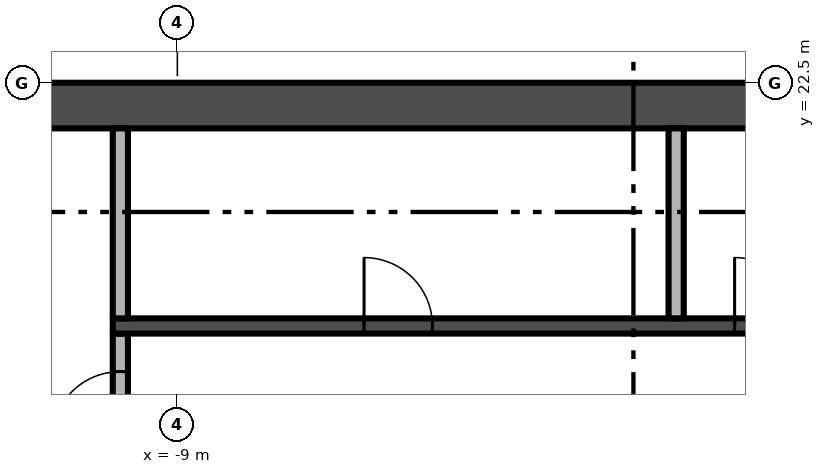
"""IFC4 building model, lengths in metres.
Left out: names, types, materials, properties, quantities, classifications, styles, units other than length and angle.
Written with IfcOpenShell. Run it as: python <this file> out.ifc"""

import sys

from ifc_helpers import new_model, si_unit, direction, frame, frame_2d, origin, place, context, subcontext, project, spatial, rectangle, extrude, element, fill, save


model = new_model("IFC4")
c1 = context("Model", 3, precision=1e-05, world=origin(), true_north=direction((0.0, 1.0)))
c2 = subcontext(c1, "Body", "Model", "MODEL_VIEW")
j1 = project(units=[si_unit("LENGTHUNIT", "METRE"), si_unit("PLANEANGLEUNIT", "RADIAN")], contexts=[c1])
p1 = place(None, origin())
s1 = spatial("IfcSite", under=j1, at=p1, CompositionType="ELEMENT")
p2 = place(p1, origin())
s2 = spatial("IfcBuilding", under=s1, at=p2, CompositionType="ELEMENT")
p3 = place(p2, frame((0.0, 0.0, 214.8)))
s3 = spatial("IfcBuildingStorey", under=s2, at=p3, CompositionType="ELEMENT", Elevation=214.8)
p4 = place(p3, frame((13.5, 22.2, -0.3), z_axis=(0.0, 0.0, 1.0), x_axis=(-1.0, 0.0, 0.0)))
e1 = element("IfcWall", 1, at=p4, inside=s3, PredefinedType="SHEAR", context=c2, shape_type="SweptSolid", body=[
    extrude(rectangle(XDim=27.0, YDim=0.6, at=frame_2d((13.5, 0.0))), origin(), (0.0, 0.0, 1.0), 3.8),
])
p5 = place(p3, frame((-9.75, 17.8, 0.0), z_axis=(0.0, 0.0, 1.0), x_axis=(0.0, 1.0, 0.0)))
e2 = element("IfcWall", 2, at=p5, inside=s3, PredefinedType="PARTITIONING", context=c2, shape_type="SweptSolid", body=[
    extrude(rectangle(XDim=1.4, YDim=0.2, at=frame_2d((0.7, 0.0))), origin(), (0.0, 0.0, 1.0), 3.5),
])
p6 = place(p5, origin())
e3 = element("IfcOpeningElement", 3, at=p6, cuts=e2, PredefinedType="OPENING", context=c2, shape_type="SweptSolid", body=[
    extrude(rectangle(XDim=0.9, YDim=2.1, at=frame_2d((0.45, 1.05))), frame((0.0, 0.11, 0.0), z_axis=(0.0, -1.0, 0.0), x_axis=(1.0, 0.0, 0.0)), (0.0, 0.0, 1.0), 0.22),
])
p7 = place(p3, frame((-9.85, 19.3, 0.0), z_axis=(0.0, 0.0, 1.0), x_axis=(1.0, 0.0, 0.0)))
e4 = element("IfcWall", 4, at=p7, inside=s3, PredefinedType="SHEAR", context=c2, shape_type="SweptSolid", body=[
    extrude(rectangle(XDim=19.7, YDim=0.2, at=frame_2d((9.85, 0.0))), origin(), (0.0, 0.0, 1.0), 3.5),
])
p8 = place(p7, frame((10.519, 0.0, 0.0)))
e5 = element("IfcOpeningElement", 5, at=p8, cuts=e4, PredefinedType="OPENING", context=c2, shape_type="SweptSolid", body=[
    extrude(rectangle(XDim=1.1, YDim=2.1, at=frame_2d((0.55, 1.05))), frame((0.0, 0.11, 0.0), z_axis=(0.0, -1.0, 0.0), x_axis=(1.0, 0.0, 0.0)), (0.0, 0.0, 1.0), 0.22),
])
p9 = place(p7, frame((12.956, 0.0, 0.0)))
e6 = element("IfcOpeningElement", 6, at=p9, cuts=e4, PredefinedType="OPENING", context=c2, shape_type="SweptSolid", body=[
    extrude(rectangle(XDim=1.1, YDim=2.1, at=frame_2d((0.55, 1.05))), frame((0.0, 0.11, 0.0), z_axis=(0.0, -1.0, 0.0), x_axis=(1.0, 0.0, 0.0)), (0.0, 0.0, 1.0), 0.22),
])
p10 = place(p7, frame((15.394, 0.0, 0.0)))
e7 = element("IfcOpeningElement", 7, at=p10, cuts=e4, PredefinedType="OPENING", context=c2, shape_type="SweptSolid", body=[
    extrude(rectangle(XDim=1.1, YDim=2.1, at=frame_2d((0.55, 1.05))), frame((0.0, 0.11, 0.0), z_axis=(0.0, -1.0, 0.0), x_axis=(1.0, 0.0, 0.0)), (0.0, 0.0, 1.0), 0.22),
])
p11 = place(p7, frame((17.831, 0.0, 0.0)))
e8 = element("IfcOpeningElement", 8, at=p11, cuts=e4, PredefinedType="OPENING", context=c2, shape_type="SweptSolid", body=[
    extrude(rectangle(XDim=1.1, YDim=2.1, at=frame_2d((0.55, 1.05))), frame((0.0, 0.11, 0.0), z_axis=(0.0, -1.0, 0.0), x_axis=(1.0, 0.0, 0.0)), (0.0, 0.0, 1.0), 0.22),
])
p12 = place(p7, frame((3.306, 0.0, 0.0)))
e9 = element("IfcOpeningElement", 9, at=p12, cuts=e4, PredefinedType="OPENING", context=c2, shape_type="SweptSolid", body=[
    extrude(rectangle(XDim=0.9, YDim=2.1, at=frame_2d((0.45, 1.05))), frame((0.0, 0.11, 0.0), z_axis=(0.0, -1.0, 0.0), x_axis=(1.0, 0.0, 0.0)), (0.0, 0.0, 1.0), 0.22),
])
p13 = place(p7, frame((8.181, 0.0, 0.0)))
e10 = element("IfcOpeningElement", 10, at=p13, cuts=e4, PredefinedType="OPENING", context=c2, shape_type="SweptSolid", body=[
    extrude(rectangle(XDim=0.9, YDim=2.1, at=frame_2d((0.45, 1.05))), frame((0.0, 0.11, 0.0), z_axis=(0.0, -1.0, 0.0), x_axis=(1.0, 0.0, 0.0)), (0.0, 0.0, 1.0), 0.22),
])
for number, where, z_axis, x_axis in (
    (11, (-9.75, 19.4, 0.0), (0.0, 0.0, 1.0), (0.0, 1.0, 0.0)),
    (12, (-2.438, 19.4, 0.0), (0.0, 0.0, 1.0), (0.0, 1.0, 0.0)),
):
    element("IfcWall", number, at=place(p3, frame(where, z_axis=z_axis, x_axis=x_axis)), inside=s3, PredefinedType="PARTITIONING", context=c2, shape_type="SweptSolid", body=[
        extrude(rectangle(XDim=2.5, YDim=0.2, at=frame_2d((1.25, 0.0))), origin(), (0.0, 0.0, 1.0), 3.5),
    ])
p14 = place(p6, origin())
e13 = element("IfcDoor", 13, at=p14, inside=s3, OperationType="SINGLE_SWING_LEFT", PredefinedType="DOOR", context=c2, shape_type="SweptSolid", body=[
    extrude(rectangle(XDim=0.9, YDim=2.1, at=frame_2d((0.45, 1.05))), frame((0.0, 0.025, 0.0), z_axis=(0.0, -1.0, 0.0), x_axis=(1.0, 0.0, 0.0)), (0.0, 0.0, 1.0), 0.05),
])
fill(e3, e13)
p15 = place(p12, origin())
e14 = element("IfcDoor", 14, at=p15, inside=s3, OperationType="SINGLE_SWING_LEFT", PredefinedType="DOOR", context=c2, shape_type="SweptSolid", body=[
    extrude(rectangle(XDim=0.9, YDim=2.1, at=frame_2d((0.45, 1.05))), frame((0.0, 0.025, 0.0), z_axis=(0.0, -1.0, 0.0), x_axis=(1.0, 0.0, 0.0)), (0.0, 0.0, 1.0), 0.05),
])
fill(e9, e14)
p16 = place(p13, origin())
e15 = element("IfcDoor", 15, at=p16, inside=s3, OperationType="SINGLE_SWING_LEFT", PredefinedType="DOOR", context=c2, shape_type="SweptSolid", body=[
    extrude(rectangle(XDim=0.9, YDim=2.1, at=frame_2d((0.45, 1.05))), frame((0.0, 0.025, 0.0), z_axis=(0.0, -1.0, 0.0), x_axis=(1.0, 0.0, 0.0)), (0.0, 0.0, 1.0), 0.05),
])
fill(e10, e15)
save(model, sys.argv[1])
